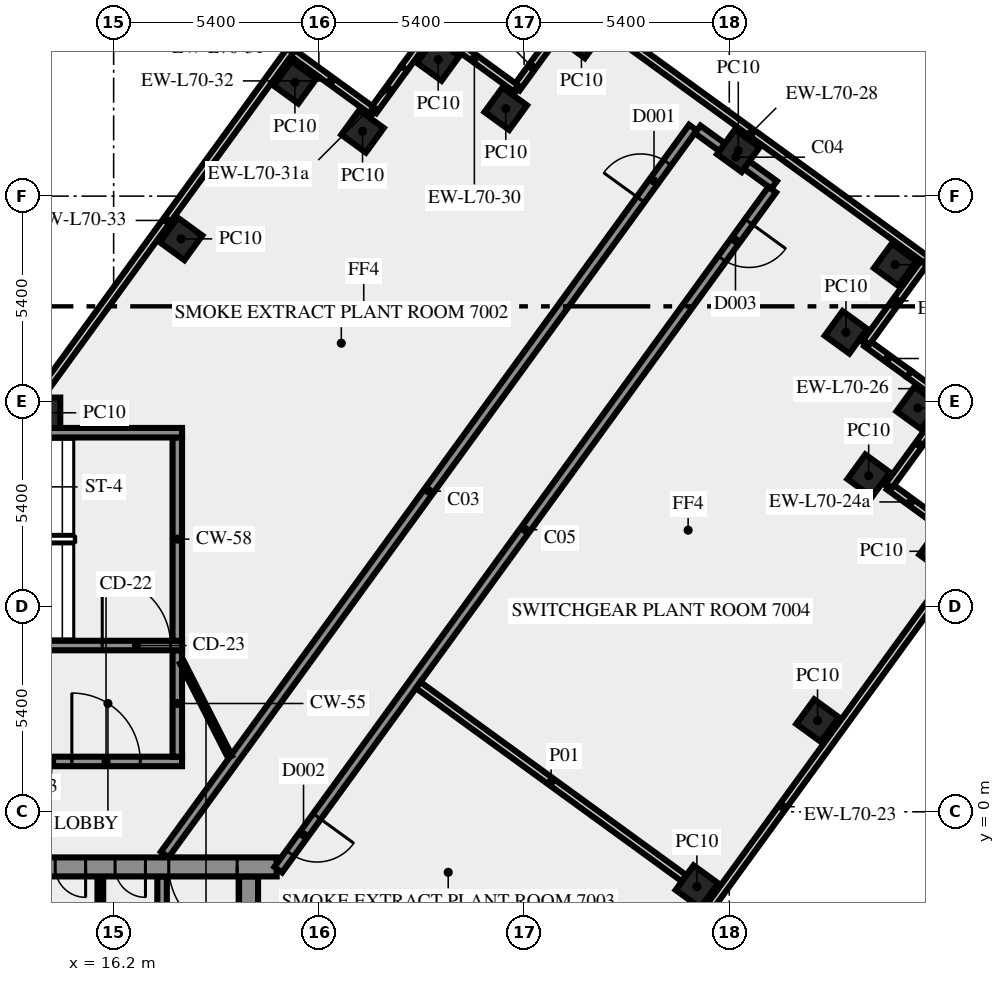
"""IFC4 building model, lengths in metres.
Left out: names, types, materials, properties, quantities, classifications, styles, units other than length and angle.
Written with IfcOpenShell. Run it as: python <this file> out.ifc"""

import sys

from ifc_helpers import new_model, si_unit, direction, frame, frame_2d, origin, origin_2d, place, context, subcontext, project, spatial, rectangle, extrude, element, fill, save


model = new_model("IFC4")
c1 = context("Model", 3, precision=1e-05, world=origin(), true_north=direction((0.0, 1.0)))
c2 = subcontext(c1, "Body", "Model", "MODEL_VIEW")
j1 = project(units=[si_unit("LENGTHUNIT", "METRE"), si_unit("PLANEANGLEUNIT", "RADIAN")], contexts=[c1])
p1 = place(None, origin())
s1 = spatial("IfcSite", under=j1, at=p1, CompositionType="ELEMENT")
p2 = place(p1, origin())
s2 = spatial("IfcBuilding", under=s1, at=p2, CompositionType="ELEMENT")
p3 = place(p2, frame((0.0, 0.0, 301.0)))
s3 = spatial("IfcBuildingStorey", under=s2, at=p3, CompositionType="ELEMENT", Elevation=301.0)
for number, where, z_axis, x_axis in (
    (1, (31.548, -1.969, 0.0), (0.0, 0.0, 1.0), (0.588, 0.809, 0.0)),
    (2, (34.722, 2.4, 0.0), (0.0, 0.0, 1.0), (0.588, 0.809, 0.0)),
    (3, (37.96, 6.855, 0.0), (0.0, 0.0, 1.0), (0.588, 0.809, 0.0)),
    (4, (36.068, 8.844, 0.0), (0.0, 0.0, 1.0), (0.588, 0.809, 0.0)),
    (5, (37.36, 10.625, 0.0), (0.0, 0.0, 1.0), (0.588, 0.809, 0.0)),
    (6, (35.471, 12.616, 0.0), (0.0, 0.0, 1.0), (-0.809, 0.588, 0.0)),
    (7, (36.765, 14.395, 0.0), (0.0, 0.0, 1.0), (-0.809, 0.588, 0.0)),
    (8, (32.637, 17.393, 0.0), (0.0, 0.0, 1.0), (-0.809, 0.588, 0.0)),
    (9, (28.51, 20.39, 0.0), (0.0, 0.0, 1.0), (-0.588, -0.809, 0.0)),
    (10, (26.519, 18.5, 0.0), (0.0, 0.0, 1.0), (-0.809, 0.588, 0.0)),
    (11, (24.74, 19.795, 0.0), (0.0, 0.0, 1.0), (-0.588, -0.809, 0.0)),
    (12, (22.749, 17.904, 0.0), (0.0, 0.0, 1.0), (-0.588, -0.809, 0.0)),
    (13, (20.97, 19.195, 0.0), (0.0, 0.0, 1.0), (-0.588, -0.809, 0.0)),
    (14, (17.974, 15.075, 0.0), (0.0, 0.0, 1.0), (-0.588, -0.809, 0.0)),
    (15, (14.395, 10.5, 0.0), (0.0, 0.0, 1.0), (-1.0, 0.0, 0.0)),
):
    element("IfcColumn", number, at=place(p3, frame(where, z_axis=z_axis, x_axis=x_axis)), inside=s3, PredefinedType="COLUMN", context=c2, shape_type="SweptSolid", body=[
        extrude(rectangle(XDim=0.8, YDim=0.8, at=origin_2d()), origin(), (0.0, 0.0, 1.0), 5.65),
    ])
p4 = place(p3, frame((28.82, -6.724, 0.0), z_axis=(0.0, 0.0, 1.0), x_axis=(0.587789790223, 0.809013697356, 0.0)))
e16 = element("IfcWall", 16, at=p4, inside=s3, PredefinedType="SOLIDWALL", context=c2, shape_type="SweptSolid", body=[
    extrude(rectangle(XDim=16.956, YDim=0.2, at=frame_2d((8.478, 0.0))), origin(), (0.0, 0.0, 1.0), 5.65),
])
p5 = place(p3, frame((37.735, 7.742, 0.0), z_axis=(0.0, 0.0, 1.0), x_axis=(-0.808970345434, 0.587849453694, 0.0)))
e17 = element("IfcWall", 17, at=p5, inside=s3, PredefinedType="SOLIDWALL", context=c2, shape_type="SweptSolid", body=[
    extrude(rectangle(XDim=1.397, YDim=0.2, at=frame_2d((0.698, 0.0))), origin(), (0.0, 0.0, 1.0), 4.15),
])
p6 = place(p3, frame((36.602, 8.58, 0.0), z_axis=(0.0, 0.0, 1.0), x_axis=(0.587822180636, 0.808990163075, 0.0)))
e18 = element("IfcWall", 18, at=p6, inside=s3, PredefinedType="SOLIDWALL", context=c2, shape_type="SweptSolid", body=[
    extrude(rectangle(XDim=2.7, YDim=0.2, at=frame_2d((1.35, 0.0))), origin(), (0.0, 0.0, 1.0), 5.65),
])
p7 = place(p3, frame((38.192, 10.748, 0.0), z_axis=(0.0, 0.0, 1.0), x_axis=(-0.808985145084, 0.587829086584, 0.0)))
e19 = element("IfcWall", 19, at=p7, inside=s3, PredefinedType="SOLIDWALL", context=c2, shape_type="SweptSolid", body=[
    extrude(rectangle(XDim=1.314, YDim=0.2, at=frame_2d((0.657, 0.0))), origin(), (0.0, 0.0, 1.0), 5.65),
])
p8 = place(p3, frame((37.129, 11.52, 0.0), z_axis=(0.0, 0.0, 1.0), x_axis=(-0.809078659976, 0.58770036751, 0.0)))
e20 = element("IfcWall", 20, at=p8, inside=s3, PredefinedType="SOLIDWALL", context=c2, shape_type="SweptSolid", body=[
    extrude(rectangle(XDim=1.386, YDim=0.2, at=frame_2d((0.693, 0.0))), origin(), (0.0, 0.0, 1.0), 4.15),
])
p9 = place(p3, frame((36.005, 12.352, 0.0), z_axis=(0.0, 0.0, 1.0), x_axis=(0.587762999008, 0.809033161865, 0.0)))
e21 = element("IfcWall", 21, at=p9, inside=s3, PredefinedType="SOLIDWALL", context=c2, shape_type="SweptSolid", body=[
    extrude(rectangle(XDim=2.7, YDim=0.2, at=frame_2d((1.35, 0.0))), origin(), (0.0, 0.0, 1.0), 5.65),
])
p10 = place(p3, frame((37.594, 14.519, 0.0), z_axis=(0.0, 0.0, 1.0), x_axis=(-0.809023074878, 0.587776883106, 0.0)))
e22 = element("IfcWall", 22, at=p10, inside=s3, PredefinedType="SOLIDWALL", context=c2, shape_type="SweptSolid", body=[
    extrude(rectangle(XDim=11.4, YDim=0.2, at=frame_2d((5.7, 0.0))), origin(), (0.0, 0.0, 1.0), 5.65),
])
p11 = place(p3, frame((27.616, 20.16, 0.0), z_axis=(0.0, 0.0, 1.0), x_axis=(-0.587731903943, -0.809055751533, 0.0)))
e23 = element("IfcWall", 23, at=p11, inside=s3, PredefinedType="SOLIDWALL", context=c2, shape_type="SweptSolid", body=[
    extrude(rectangle(XDim=1.386, YDim=0.2, at=frame_2d((0.693, 0.0))), origin(), (0.0, 0.0, 1.0), 4.15),
])
p12 = place(p3, frame((26.785, 19.036, 0.0), z_axis=(0.0, 0.0, 1.0), x_axis=(-0.809064397168, 0.587720002413, 0.0)))
e24 = element("IfcWall", 24, at=p12, inside=s3, PredefinedType="SOLIDWALL", context=c2, shape_type="SweptSolid", body=[
    extrude(rectangle(XDim=2.7, YDim=0.2, at=frame_2d((1.35, 0.0))), origin(), (0.0, 0.0, 1.0), 5.65),
])
p13 = place(p3, frame((24.617, 20.625, 0.0), z_axis=(0.0, 0.0, 1.0), x_axis=(-0.587772972264, -0.809025916196, 0.0)))
e25 = element("IfcWall", 25, at=p13, inside=s3, PredefinedType="SOLIDWALL", context=c2, shape_type="SweptSolid", body=[
    extrude(rectangle(XDim=1.311, YDim=0.2, at=frame_2d((0.655, 0.0))), origin(), (0.0, 0.0, 1.0), 5.65),
])
p14 = place(p3, frame((23.846, 19.565, 0.0), z_axis=(0.0, 0.0, 1.0), x_axis=(-0.587753586678, -0.809039999844, 0.0)))
e26 = element("IfcWall", 26, at=p14, inside=s3, PredefinedType="SOLIDWALL", context=c2, shape_type="SweptSolid", body=[
    extrude(rectangle(XDim=1.389, YDim=0.2, at=frame_2d((0.694, 0.0))), origin(), (0.0, 0.0, 1.0), 4.15),
])
p15 = place(p3, frame((23.013, 18.438, 0.0), z_axis=(0.0, 0.0, 1.0), x_axis=(-0.808990163075, 0.587822180636, 0.0)))
e27 = element("IfcWall", 27, at=p15, inside=s3, PredefinedType="SOLIDWALL", context=c2, shape_type="SweptSolid", body=[
    extrude(rectangle(XDim=2.7, YDim=0.2, at=frame_2d((1.35, 0.0))), origin(), (0.0, 0.0, 1.0), 5.65),
])
p16 = place(p3, frame((20.846, 20.028, 0.0), z_axis=(0.0, 0.0, 1.0), x_axis=(-0.58779571445, -0.809009393069, 0.0)))
e28 = element("IfcWall", 28, at=p16, inside=s3, PredefinedType="SOLIDWALL", context=c2, shape_type="SweptSolid", body=[
    extrude(rectangle(XDim=11.044, YDim=0.2, at=frame_2d((5.522, 0.0))), origin(), (0.0, 0.0, 1.0), 5.65),
])
p17 = place(p3, frame((19.75, -10.5, 0.0), z_axis=(0.0, 0.0, 1.0), x_axis=(0.0, 1.0, 0.0)))
e29 = element("IfcWall", 29, at=p17, inside=s3, PredefinedType="SHEAR", context=c2, shape_type="SweptSolid", body=[
    extrude(rectangle(XDim=8.8, YDim=0.5, at=frame_2d((4.4, 0.0))), origin(), (0.0, 0.0, 1.0), 5.65),
])
p18 = place(p3, frame((17.475, -6.0, 0.0), z_axis=(0.0, 0.0, 1.0), x_axis=(0.0, 1.0, 0.0)))
e30 = element("IfcWall", 30, at=p18, inside=s3, PredefinedType="SHEAR", context=c2, shape_type="SweptSolid", body=[
    extrude(rectangle(XDim=4.3, YDim=0.25, at=frame_2d((2.15, 0.0))), origin(), (0.0, 0.0, 1.0), 5.65),
])
p19 = place(p18, frame((0.55, 0.0, 0.0)))
e31 = element("IfcOpeningElement", 31, at=p19, cuts=e30, PredefinedType="OPENING", context=c2, shape_type="SweptSolid", body=[
    extrude(rectangle(XDim=1.3, YDim=2.1, at=frame_2d((0.65, 1.05))), frame((0.0, 0.135, 0.0), z_axis=(0.0, -1.0, 0.0), x_axis=(1.0, 0.0, 0.0)), (0.0, 0.0, 1.0), 0.27),
])
p20 = place(p3, frame((15.85, -3.35, 0.0), z_axis=(0.0, 0.0, 1.0), x_axis=(0.0, 1.0, 0.0)))
e32 = element("IfcWall", 32, at=p20, inside=s3, PredefinedType="PARTITIONING", context=c2, shape_type="SweptSolid", body=[
    extrude(rectangle(XDim=1.65, YDim=0.15, at=frame_2d((0.825, 0.0))), origin(), (0.0, 0.0, 1.0), 5.65),
])
p21 = place(p3, frame((20.49, -1.45, 0.0), z_axis=(0.0, 0.0, 1.0), x_axis=(-1.0, 0.0, 0.0)))
e33 = element("IfcWall", 33, at=p21, inside=s3, PredefinedType="SHEAR", context=c2, shape_type="SweptSolid", body=[
    extrude(rectangle(XDim=40.98, YDim=0.5, at=frame_2d((20.49, 0.0))), origin(), (0.0, 0.0, 1.0), 5.65),
])
p22 = place(p21, frame((38.14, 0.0, 0.0)))
e34 = element("IfcOpeningElement", 34, at=p22, cuts=e33, PredefinedType="OPENING", context=c2, shape_type="SweptSolid", body=[
    extrude(rectangle(XDim=1.8, YDim=2.1, at=frame_2d((0.9, 1.05))), frame((0.0, 0.26, 0.0), z_axis=(0.0, -1.0, 0.0), x_axis=(1.0, 0.0, 0.0)), (0.0, 0.0, 1.0), 0.52),
])
p23 = place(p21, frame((35.89, 0.0, 0.0)))
e35 = element("IfcOpeningElement", 35, at=p23, cuts=e33, PredefinedType="OPENING", context=c2, shape_type="SweptSolid", body=[
    extrude(rectangle(XDim=0.9, YDim=2.1, at=frame_2d((0.45, 1.05))), frame((0.0, 0.26, 0.0), z_axis=(0.0, -1.0, 0.0), x_axis=(1.0, 0.0, 0.0)), (0.0, 0.0, 1.0), 0.52),
])
p24 = place(p21, frame((32.94, 0.0, 0.0)))
e36 = element("IfcOpeningElement", 36, at=p24, cuts=e33, PredefinedType="OPENING", context=c2, shape_type="SweptSolid", body=[
    extrude(rectangle(XDim=0.9, YDim=2.1, at=frame_2d((0.45, 1.05))), frame((0.0, 0.26, 0.0), z_axis=(0.0, -1.0, 0.0), x_axis=(1.0, 0.0, 0.0)), (0.0, 0.0, 1.0), 0.52),
])
p25 = place(p21, frame((21.765, 0.0, 0.0)))
e37 = element("IfcOpeningElement", 37, at=p25, cuts=e33, PredefinedType="OPENING", context=c2, shape_type="SweptSolid", body=[
    extrude(rectangle(XDim=2.0, YDim=2.1, at=frame_2d((1.0, 1.05))), frame((0.0, 0.26, 0.0), z_axis=(0.0, -1.0, 0.0), x_axis=(1.0, 0.0, 0.0)), (0.0, 0.0, 1.0), 0.52),
])
p26 = place(p21, frame((14.903, 0.0, 0.0)))
e38 = element("IfcOpeningElement", 38, at=p26, cuts=e33, PredefinedType="OPENING", context=c2, shape_type="SweptSolid", body=[
    extrude(rectangle(XDim=0.9, YDim=2.1, at=frame_2d((0.45, 1.05))), frame((0.0, 0.26, 0.0), z_axis=(0.0, -1.0, 0.0), x_axis=(1.0, 0.0, 0.0)), (0.0, 0.0, 1.0), 0.52),
])
p27 = place(p21, frame((12.54, 0.0, 0.0)))
e39 = element("IfcOpeningElement", 39, at=p27, cuts=e33, PredefinedType="OPENING", context=c2, shape_type="SweptSolid", body=[
    extrude(rectangle(XDim=0.9, YDim=2.1, at=frame_2d((0.45, 1.05))), frame((0.0, 0.26, 0.0), z_axis=(0.0, -1.0, 0.0), x_axis=(1.0, 0.0, 0.0)), (0.0, 0.0, 1.0), 0.52),
])
p28 = place(p21, frame((9.877, 0.0, 0.0)))
e40 = element("IfcOpeningElement", 40, at=p28, cuts=e33, PredefinedType="OPENING", context=c2, shape_type="SweptSolid", body=[
    extrude(rectangle(XDim=0.9, YDim=2.1, at=frame_2d((0.45, 1.05))), frame((0.0, 0.26, 0.0), z_axis=(0.0, -1.0, 0.0), x_axis=(1.0, 0.0, 0.0)), (0.0, 0.0, 1.0), 0.52),
])
p29 = place(p21, frame((7.14, 0.0, 0.0)))
e41 = element("IfcOpeningElement", 41, at=p29, cuts=e33, PredefinedType="OPENING", context=c2, shape_type="SweptSolid", body=[
    extrude(rectangle(XDim=0.9, YDim=2.1, at=frame_2d((0.45, 1.05))), frame((0.0, 0.26, 0.0), z_axis=(0.0, -1.0, 0.0), x_axis=(1.0, 0.0, 0.0)), (0.0, 0.0, 1.0), 0.52),
])
p30 = place(p21, frame((5.028, 0.0, 0.0)))
e42 = element("IfcOpeningElement", 42, at=p30, cuts=e33, PredefinedType="OPENING", context=c2, shape_type="SweptSolid", body=[
    extrude(rectangle(XDim=0.8, YDim=2.1, at=frame_2d((0.4, 1.05))), frame((0.0, 0.26, 0.0), z_axis=(0.0, -1.0, 0.0), x_axis=(1.0, 0.0, 0.0)), (0.0, 0.0, 1.0), 0.52),
])
p31 = place(p21, frame((3.452, 0.0, 0.0)))
e43 = element("IfcOpeningElement", 43, at=p31, cuts=e33, PredefinedType="OPENING", context=c2, shape_type="SweptSolid", body=[
    extrude(rectangle(XDim=0.8, YDim=2.1, at=frame_2d((0.4, 1.05))), frame((0.0, 0.26, 0.0), z_axis=(0.0, -1.0, 0.0), x_axis=(1.0, 0.0, 0.0)), (0.0, 0.0, 1.0), 0.52),
])
p32 = place(p21, frame((1.04, 0.0, 0.0)))
e44 = element("IfcOpeningElement", 44, at=p32, cuts=e33, PredefinedType="OPENING", context=c2, shape_type="SweptSolid", body=[
    extrude(rectangle(XDim=1.8, YDim=2.1, at=frame_2d((0.9, 1.05))), frame((0.0, 0.26, 0.0), z_axis=(0.0, -1.0, 0.0), x_axis=(1.0, 0.0, 0.0)), (0.0, 0.0, 1.0), 0.52),
])
p33 = place(p3, frame((14.1, 1.325, 0.0), z_axis=(0.0, 0.0, 1.0), x_axis=(1.0, 0.0, 0.0)))
e45 = element("IfcWall", 45, at=p33, inside=s3, PredefinedType="SHEAR", context=c2, shape_type="SweptSolid", body=[
    extrude(rectangle(XDim=3.9, YDim=0.25, at=frame_2d((1.95, 0.0))), origin(), (0.0, 0.0, 1.0), 5.65),
])
p34 = place(p33, frame((1.0, 0.0, 0.0)))
e46 = element("IfcOpeningElement", 46, at=p34, cuts=e45, PredefinedType="OPENING", context=c2, shape_type="SweptSolid", body=[
    extrude(rectangle(XDim=1.8, YDim=2.1, at=frame_2d((0.9, 1.05))), frame((0.0, 0.135, 0.0), z_axis=(0.0, -1.0, 0.0), x_axis=(1.0, 0.0, 0.0)), (0.0, 0.0, 1.0), 0.27),
])
p35 = place(p3, frame((17.875, 1.45, 0.0), z_axis=(0.0, 0.0, 1.0), x_axis=(0.0, 1.0, 0.0)))
e47 = element("IfcWall", 47, at=p35, inside=s3, PredefinedType="SHEAR", context=c2, shape_type="SweptSolid", body=[
    extrude(rectangle(XDim=2.8, YDim=0.25, at=frame_2d((1.4, 0.0))), origin(), (0.0, 0.0, 1.0), 5.65),
])
p36 = place(p3, frame((7.5, 4.375, 0.0), z_axis=(0.0, 0.0, 1.0), x_axis=(1.0, 0.0, 0.0)))
e48 = element("IfcWall", 48, at=p36, inside=s3, PredefinedType="SHEAR", context=c2, shape_type="SweptSolid", body=[
    extrude(rectangle(XDim=10.5, YDim=0.25, at=frame_2d((5.25, 0.0))), origin(), (0.0, 0.0, 1.0), 5.65),
])
p37 = place(p36, frame((8.4, 0.0, 0.0)))
e49 = element("IfcOpeningElement", 49, at=p37, cuts=e48, PredefinedType="OPENING", context=c2, shape_type="SweptSolid", body=[
    extrude(rectangle(XDim=1.8, YDim=2.1, at=frame_2d((0.9, 1.05))), frame((0.0, 0.135, 0.0), z_axis=(0.0, -1.0, 0.0), x_axis=(1.0, 0.0, 0.0)), (0.0, 0.0, 1.0), 0.27),
])
p38 = place(p3, frame((17.875, 4.5, 0.0), z_axis=(0.0, 0.0, 1.0), x_axis=(0.0, 1.0, 0.0)))
e50 = element("IfcWall", 50, at=p38, inside=s3, PredefinedType="SHEAR", context=c2, shape_type="SweptSolid", body=[
    extrude(rectangle(XDim=5.35, YDim=0.25, at=frame_2d((2.675, 0.0))), origin(), (0.0, 0.0, 1.0), 5.65),
])
p39 = place(p3, frame((7.5, 9.975, 0.0), z_axis=(0.0, 0.0, 1.0), x_axis=(1.0, 0.0, 0.0)))
e51 = element("IfcWall", 51, at=p39, inside=s3, PredefinedType="SHEAR", context=c2, shape_type="SweptSolid", body=[
    extrude(rectangle(XDim=10.5, YDim=0.25, at=frame_2d((5.25, 0.0))), origin(), (0.0, 0.0, 1.0), 5.65),
])
p40 = place(p39, frame((2.0, 0.0, 1.0)))
e52 = element("IfcOpeningElement", 52, at=p40, cuts=e51, PredefinedType="OPENING", context=c2, shape_type="SweptSolid", body=[
    extrude(rectangle(XDim=1.2, YDim=1.2, at=frame_2d((0.6, 0.6))), frame((0.0, 0.135, 0.0), z_axis=(0.0, -1.0, 0.0), x_axis=(1.0, 0.0, 0.0)), (0.0, 0.0, 1.0), 0.27),
])
p41 = place(p3, frame((17.545, -1.125, 0.0), z_axis=(0.0, 0.0, 1.0), x_axis=(0.587789755823, 0.80901372235, 0.0)))
e53 = element("IfcWall", 53, at=p41, inside=s3, PredefinedType="SOLIDWALL", context=c2, shape_type="SweptSolid", body=[
    extrude(rectangle(XDim=23.645, YDim=0.25, at=frame_2d((11.822, 0.0))), origin(), (0.0, 0.0, 1.0), 5.65),
])
p42 = place(p41, frame((21.303, 0.0, 0.0)))
e54 = element("IfcOpeningElement", 54, at=p42, cuts=e53, PredefinedType="OPENING", context=c2, shape_type="SweptSolid", body=[
    extrude(rectangle(XDim=1.2, YDim=2.1, at=frame_2d((0.6, 1.05))), frame((0.0, 0.135, 0.0), z_axis=(0.0, -1.0, 0.0), x_axis=(1.0, 0.0, 0.0)), (0.0, 0.0, 1.0), 0.27),
])
p43 = place(p3, frame((31.567, 17.956, 0.0), z_axis=(0.0, 0.0, 1.0), x_axis=(0.809011863271, -0.587792314586, 0.0)))
e55 = element("IfcWall", 55, at=p43, inside=s3, PredefinedType="SOLIDWALL", context=c2, shape_type="SweptSolid", body=[
    extrude(rectangle(XDim=2.488, YDim=0.25, at=frame_2d((1.244, 0.0))), origin(), (0.0, 0.0, 1.0), 5.65),
])
p44 = place(p3, frame((33.531, 16.369, 0.0), z_axis=(0.0, 0.0, 1.0), x_axis=(-0.587781095509, -0.809020014438, 0.0)))
e56 = element("IfcWall", 56, at=p44, inside=s3, PredefinedType="SOLIDWALL", context=c2, shape_type="SweptSolid", body=[
    extrude(rectangle(XDim=22.117, YDim=0.25, at=frame_2d((11.058, 0.0))), origin(), (0.0, 0.0, 1.0), 5.65),
])
p45 = place(p44, frame((20.384, 0.0, 0.0)))
e57 = element("IfcOpeningElement", 57, at=p45, cuts=e56, PredefinedType="OPENING", context=c2, shape_type="SweptSolid", body=[
    extrude(rectangle(XDim=1.2, YDim=2.1, at=frame_2d((0.6, 1.05))), frame((0.0, 0.135, 0.0), z_axis=(0.0, -1.0, 0.0), x_axis=(1.0, 0.0, 0.0)), (0.0, 0.0, 1.0), 0.27),
])
p46 = place(p44, frame((1.046, 0.0, 0.0)))
e58 = element("IfcOpeningElement", 58, at=p46, cuts=e56, PredefinedType="OPENING", context=c2, shape_type="SweptSolid", body=[
    extrude(rectangle(XDim=1.2, YDim=2.1, at=frame_2d((0.6, 1.05))), frame((0.0, 0.135, 0.0), z_axis=(0.0, -1.0, 0.0), x_axis=(1.0, 0.0, 0.0)), (0.0, 0.0, 1.0), 0.27),
])
p47 = place(p3, frame((31.209, -1.747, 0.0), z_axis=(0.0, 0.0, 1.0), x_axis=(-0.80898392027, 0.587830772199, 0.0)))
e59 = element("IfcWall", 59, at=p47, inside=s3, PredefinedType="SOLIDWALL", context=c2, shape_type="SweptSolid", body=[
    extrude(rectangle(XDim=8.645, YDim=0.2, at=frame_2d((4.323, 0.0))), origin(), (0.0, 0.0, 1.0), 5.65),
])
p48 = place(p3, frame((18.0, 3.925, 0.0), z_axis=(0.0, 0.0, 1.0), x_axis=(0.453950796792, -0.891026752736, 0.0)))
e60 = element("IfcWall", 60, at=p48, inside=s3, PredefinedType="PARTITIONING", context=c2, shape_type="SweptSolid", body=[
    extrude(rectangle(XDim=2.778, YDim=0.12, at=frame_2d((1.389, 0.0))), origin(), (0.0, 0.0, 1.0), 5.65),
])
p49 = place(p30, origin())
e61 = element("IfcDoor", 61, at=p49, inside=s3, OperationType="SINGLE_SWING_LEFT", PredefinedType="DOOR", context=c2, shape_type="SweptSolid", body=[
    extrude(rectangle(XDim=0.8, YDim=2.1, at=frame_2d((0.4, 1.05))), frame((0.0, 0.025, 0.0), z_axis=(0.0, -1.0, 0.0), x_axis=(1.0, 0.0, 0.0)), (0.0, 0.0, 1.0), 0.05),
])
fill(e42, e61)
p50 = place(p31, origin())
e62 = element("IfcDoor", 62, at=p50, inside=s3, OperationType="SINGLE_SWING_LEFT", PredefinedType="DOOR", context=c2, shape_type="SweptSolid", body=[
    extrude(rectangle(XDim=0.8, YDim=2.1, at=frame_2d((0.4, 1.05))), frame((0.0, 0.025, 0.0), z_axis=(0.0, -1.0, 0.0), x_axis=(1.0, 0.0, 0.0)), (0.0, 0.0, 1.0), 0.05),
])
fill(e43, e62)
p51 = place(p32, origin())
e63 = element("IfcDoor", 63, at=p51, inside=s3, OperationType="DOUBLE_DOOR_SINGLE_SWING", PredefinedType="DOOR", context=c2, shape_type="SweptSolid", body=[
    extrude(rectangle(XDim=1.8, YDim=2.1, at=frame_2d((0.9, 1.05))), frame((0.0, 0.025, 0.0), z_axis=(0.0, -1.0, 0.0), x_axis=(1.0, 0.0, 0.0)), (0.0, 0.0, 1.0), 0.05),
])
fill(e44, e63)
p52 = place(p34, origin())
e64 = element("IfcDoor", 64, at=p52, inside=s3, OperationType="DOUBLE_DOOR_SINGLE_SWING", PredefinedType="DOOR", context=c2, shape_type="SweptSolid", body=[
    extrude(rectangle(XDim=1.8, YDim=2.1, at=frame_2d((0.9, 1.05))), frame((0.0, 0.025, 0.0), z_axis=(0.0, -1.0, 0.0), x_axis=(1.0, 0.0, 0.0)), (0.0, 0.0, 1.0), 0.05),
])
fill(e46, e64)
p53 = place(p37, origin())
e65 = element("IfcDoor", 65, at=p53, inside=s3, OperationType="DOUBLE_DOOR_SINGLE_SWING", PredefinedType="DOOR", context=c2, shape_type="SweptSolid", body=[
    extrude(rectangle(XDim=1.8, YDim=2.1, at=frame_2d((0.9, 1.05))), frame((0.0, 0.025, 0.0), z_axis=(0.0, -1.0, 0.0), x_axis=(1.0, 0.0, 0.0)), (0.0, 0.0, 1.0), 0.05),
])
fill(e49, e65)
p54 = place(p42, origin())
e66 = element("IfcDoor", 66, at=p54, inside=s3, OperationType="SINGLE_SWING_RIGHT", PredefinedType="DOOR", context=c2, shape_type="SweptSolid", body=[
    extrude(rectangle(XDim=1.2, YDim=2.1, at=frame_2d((0.6, 1.05))), frame((0.0, 0.025, 0.0), z_axis=(0.0, -1.0, 0.0), x_axis=(1.0, 0.0, 0.0)), (0.0, 0.0, 1.0), 0.05),
])
fill(e54, e66)
p55 = place(p45, origin())
e67 = element("IfcDoor", 67, at=p55, inside=s3, OperationType="SINGLE_SWING_RIGHT", PredefinedType="DOOR", context=c2, shape_type="SweptSolid", body=[
    extrude(rectangle(XDim=1.2, YDim=2.1, at=frame_2d((0.6, 1.05))), frame((0.0, 0.025, 0.0), z_axis=(0.0, -1.0, 0.0), x_axis=(1.0, 0.0, 0.0)), (0.0, 0.0, 1.0), 0.05),
])
fill(e57, e67)
p56 = place(p46, origin())
e68 = element("IfcDoor", 68, at=p56, inside=s3, OperationType="SINGLE_SWING_LEFT", PredefinedType="DOOR", context=c2, shape_type="SweptSolid", body=[
    extrude(rectangle(XDim=1.2, YDim=2.1, at=frame_2d((0.6, 1.05))), frame((0.0, 0.025, 0.0), z_axis=(0.0, -1.0, 0.0), x_axis=(1.0, 0.0, 0.0)), (0.0, 0.0, 1.0), 0.05),
])
fill(e58, e68)
save(model, sys.argv[1])
